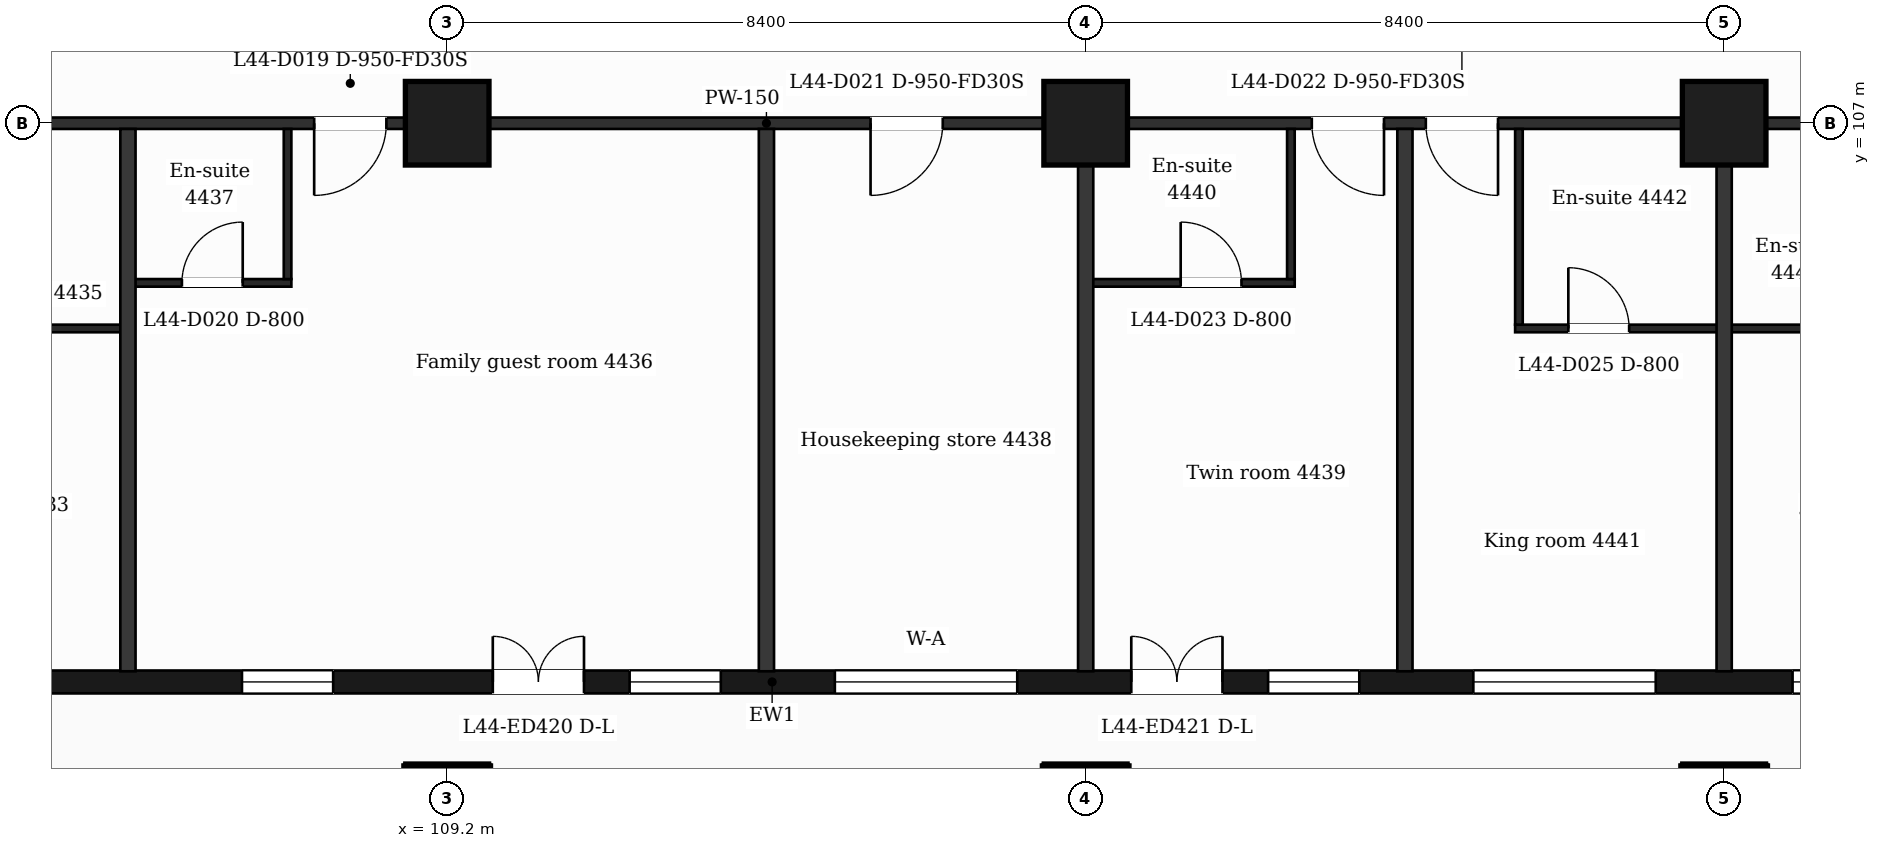
"""IFC4 building model, lengths in metres.
Left out: names, types, materials, properties, quantities, classifications, styles, units other than length and angle.
Written with IfcOpenShell. Run it as: python <this file> out.ifc"""

import sys

from ifc_helpers import new_model, si_unit, direction, frame, frame_2d, origin, origin_2d, place, context, subcontext, project, spatial, rectangle, extrude, element, fill, save


model = new_model("IFC4")
c1 = context("Model", 3, precision=1e-05, world=origin(), true_north=direction((0.0, 1.0)))
c2 = subcontext(c1, "Body", "Model", "MODEL_VIEW")
j1 = project(units=[si_unit("LENGTHUNIT", "METRE"), si_unit("PLANEANGLEUNIT", "RADIAN")], contexts=[c1])
p1 = place(None, origin())
s1 = spatial("IfcSite", under=j1, at=p1, CompositionType="ELEMENT")
p2 = place(p1, origin())
s2 = spatial("IfcBuilding", under=s1, at=p2, CompositionType="ELEMENT")
p3 = place(p2, frame((0.0, 0.0, 184.8)))
s3 = spatial("IfcBuildingStorey", under=s2, at=p3, CompositionType="ELEMENT", Elevation=184.8)
for number, where, z_axis, x_axis in (
    (1, (109.2, 98.0, 0.0), (0.0, 0.0, 1.0), (1.0, 0.0, 0.0)),
    (2, (117.6, 98.0, 0.0), (0.0, 0.0, 1.0), (1.0, 0.0, 0.0)),
    (3, (126.0, 98.0, 0.0), (0.0, 0.0, 1.0), (1.0, 0.0, 0.0)),
    (4, (109.2, 107.0, 0.0), (0.0, 0.0, 1.0), (1.0, 0.0, 0.0)),
    (5, (117.6, 107.0, 0.0), (0.0, 0.0, 1.0), (1.0, 0.0, 0.0)),
    (6, (126.0, 107.0, 0.0), (0.0, 0.0, 1.0), (1.0, 0.0, 0.0)),
):
    element("IfcColumn", number, at=place(p3, frame(where, z_axis=z_axis, x_axis=x_axis)), inside=s3, PredefinedType="COLUMN", context=c2, shape_type="SweptSolid", body=[
        extrude(rectangle(XDim=1.1, YDim=1.1, at=origin_2d()), origin(), (0.0, 0.0, 1.0), 3.7),
    ])
p4 = place(p3, frame((89.85, 99.65, 0.0), z_axis=(0.0, 0.0, 1.0), x_axis=(1.0, 0.0, 0.0)))
e7 = element("IfcWall", 7, at=p4, inside=s3, PredefinedType="SOLIDWALL", context=c2, shape_type="SweptSolid", body=[
    extrude(rectangle(XDim=47.25, YDim=0.3, at=frame_2d((23.625, 0.0))), origin(), (0.0, 0.0, 1.0), 3.38),
])
p5 = place(p4, frame((0.725, 0.0, 0.9)))
e8 = element("IfcOpeningElement", 8, at=p5, cuts=e7, PredefinedType="OPENING", context=c2, shape_type="SweptSolid", body=[
    extrude(rectangle(XDim=1.2, YDim=2.1, at=frame_2d((0.6, 1.05))), frame((0.0, 0.16, 0.0), z_axis=(0.0, -1.0, 0.0), x_axis=(1.0, 0.0, 0.0)), (0.0, 0.0, 1.0), 0.32),
])
p6 = place(p4, frame((3.45, 0.0, 0.9)))
e9 = element("IfcOpeningElement", 9, at=p6, cuts=e7, PredefinedType="OPENING", context=c2, shape_type="SweptSolid", body=[
    extrude(rectangle(XDim=2.4, YDim=2.1, at=frame_2d((1.2, 1.05))), frame((0.0, 0.16, 0.0), z_axis=(0.0, -1.0, 0.0), x_axis=(1.0, 0.0, 0.0)), (0.0, 0.0, 1.0), 0.32),
])
p7 = place(p4, frame((7.65, 0.0, 0.9)))
e10 = element("IfcOpeningElement", 10, at=p7, cuts=e7, PredefinedType="OPENING", context=c2, shape_type="SweptSolid", body=[
    extrude(rectangle(XDim=2.4, YDim=2.1, at=frame_2d((1.2, 1.05))), frame((0.0, 0.16, 0.0), z_axis=(0.0, -1.0, 0.0), x_axis=(1.0, 0.0, 0.0)), (0.0, 0.0, 1.0), 0.32),
])
p8 = place(p4, frame((12.45, 0.0, 0.9)))
e11 = element("IfcOpeningElement", 11, at=p8, cuts=e7, PredefinedType="OPENING", context=c2, shape_type="SweptSolid", body=[
    extrude(rectangle(XDim=1.2, YDim=2.1, at=frame_2d((0.6, 1.05))), frame((0.0, 0.16, 0.0), z_axis=(0.0, -1.0, 0.0), x_axis=(1.0, 0.0, 0.0)), (0.0, 0.0, 1.0), 0.32),
])
p9 = place(p4, frame((16.65, 0.0, 0.9)))
e12 = element("IfcOpeningElement", 12, at=p9, cuts=e7, PredefinedType="OPENING", context=c2, shape_type="SweptSolid", body=[
    extrude(rectangle(XDim=1.2, YDim=2.1, at=frame_2d((0.6, 1.05))), frame((0.0, 0.16, 0.0), z_axis=(0.0, -1.0, 0.0), x_axis=(1.0, 0.0, 0.0)), (0.0, 0.0, 1.0), 0.32),
])
p10 = place(p4, frame((19.95, 0.0, 0.0)))
e13 = element("IfcOpeningElement", 13, at=p10, cuts=e7, PredefinedType="OPENING", context=c2, shape_type="SweptSolid", body=[
    extrude(rectangle(XDim=1.2, YDim=2.4, at=frame_2d((0.6, 1.2))), frame((0.0, 0.16, 0.0), z_axis=(0.0, -1.0, 0.0), x_axis=(1.0, 0.0, 0.0)), (0.0, 0.0, 1.0), 0.32),
])
p11 = place(p4, frame((21.75, 0.0, 0.9)))
e14 = element("IfcOpeningElement", 14, at=p11, cuts=e7, PredefinedType="OPENING", context=c2, shape_type="SweptSolid", body=[
    extrude(rectangle(XDim=1.2, YDim=2.1, at=frame_2d((0.6, 1.05))), frame((0.0, 0.16, 0.0), z_axis=(0.0, -1.0, 0.0), x_axis=(1.0, 0.0, 0.0)), (0.0, 0.0, 1.0), 0.32),
])
p12 = place(p4, frame((24.45, 0.0, 0.9)))
e15 = element("IfcOpeningElement", 15, at=p12, cuts=e7, PredefinedType="OPENING", context=c2, shape_type="SweptSolid", body=[
    extrude(rectangle(XDim=2.4, YDim=2.1, at=frame_2d((1.2, 1.05))), frame((0.0, 0.16, 0.0), z_axis=(0.0, -1.0, 0.0), x_axis=(1.0, 0.0, 0.0)), (0.0, 0.0, 1.0), 0.32),
])
p13 = place(p4, frame((28.35, 0.0, 0.0)))
e16 = element("IfcOpeningElement", 16, at=p13, cuts=e7, PredefinedType="OPENING", context=c2, shape_type="SweptSolid", body=[
    extrude(rectangle(XDim=1.2, YDim=2.4, at=frame_2d((0.6, 1.2))), frame((0.0, 0.16, 0.0), z_axis=(0.0, -1.0, 0.0), x_axis=(1.0, 0.0, 0.0)), (0.0, 0.0, 1.0), 0.32),
])
p14 = place(p4, frame((30.15, 0.0, 0.9)))
e17 = element("IfcOpeningElement", 17, at=p14, cuts=e7, PredefinedType="OPENING", context=c2, shape_type="SweptSolid", body=[
    extrude(rectangle(XDim=1.2, YDim=2.1, at=frame_2d((0.6, 1.05))), frame((0.0, 0.16, 0.0), z_axis=(0.0, -1.0, 0.0), x_axis=(1.0, 0.0, 0.0)), (0.0, 0.0, 1.0), 0.32),
])
p15 = place(p4, frame((32.85, 0.0, 0.9)))
e18 = element("IfcOpeningElement", 18, at=p15, cuts=e7, PredefinedType="OPENING", context=c2, shape_type="SweptSolid", body=[
    extrude(rectangle(XDim=2.4, YDim=2.1, at=frame_2d((1.2, 1.05))), frame((0.0, 0.16, 0.0), z_axis=(0.0, -1.0, 0.0), x_axis=(1.0, 0.0, 0.0)), (0.0, 0.0, 1.0), 0.32),
])
p16 = place(p4, frame((37.05, 0.0, 0.9)))
e19 = element("IfcOpeningElement", 19, at=p16, cuts=e7, PredefinedType="OPENING", context=c2, shape_type="SweptSolid", body=[
    extrude(rectangle(XDim=2.4, YDim=2.1, at=frame_2d((1.2, 1.05))), frame((0.0, 0.16, 0.0), z_axis=(0.0, -1.0, 0.0), x_axis=(1.0, 0.0, 0.0)), (0.0, 0.0, 1.0), 0.32),
])
p17 = place(p4, frame((41.85, 0.0, 0.9)))
e20 = element("IfcOpeningElement", 20, at=p17, cuts=e7, PredefinedType="OPENING", context=c2, shape_type="SweptSolid", body=[
    extrude(rectangle(XDim=1.2, YDim=2.1, at=frame_2d((0.6, 1.05))), frame((0.0, 0.16, 0.0), z_axis=(0.0, -1.0, 0.0), x_axis=(1.0, 0.0, 0.0)), (0.0, 0.0, 1.0), 0.32),
])
p18 = place(p4, frame((45.25, 0.0, 0.9)))
e21 = element("IfcOpeningElement", 21, at=p18, cuts=e7, PredefinedType="OPENING", context=c2, shape_type="SweptSolid", body=[
    extrude(rectangle(XDim=1.2, YDim=2.1, at=frame_2d((0.6, 1.05))), frame((0.0, 0.16, 0.0), z_axis=(0.0, -1.0, 0.0), x_axis=(1.0, 0.0, 0.0)), (0.0, 0.0, 1.0), 0.32),
])
p19 = place(p3, frame((102.55, 104.3, 0.0), z_axis=(0.0, 0.0, 1.0), x_axis=(1.0, 0.0, 0.0)))
e22 = element("IfcWall", 22, at=p19, inside=s3, PredefinedType="PARTITIONING", context=c2, shape_type="SweptSolid", body=[
    extrude(rectangle(XDim=2.45, YDim=0.1, at=frame_2d((1.225, 0.0))), origin(), (0.0, 0.0, 1.0), 3.38),
])
p20 = place(p3, frame((123.25, 104.3, 0.0), z_axis=(0.0, 0.0, 1.0), x_axis=(1.0, 0.0, 0.0)))
e23 = element("IfcWall", 23, at=p20, inside=s3, PredefinedType="PARTITIONING", context=c2, shape_type="SweptSolid", body=[
    extrude(rectangle(XDim=4.9, YDim=0.1, at=frame_2d((2.45, 0.0))), origin(), (0.0, 0.0, 1.0), 3.38),
])
p21 = place(p20, frame((0.7, 0.0, 0.0)))
e24 = element("IfcOpeningElement", 24, at=p21, cuts=e23, PredefinedType="OPENING", context=c2, shape_type="SweptSolid", body=[
    extrude(rectangle(XDim=0.8, YDim=2.1, at=frame_2d((0.4, 1.05))), frame((0.0, 0.06, 0.0), z_axis=(0.0, -1.0, 0.0), x_axis=(1.0, 0.0, 0.0)), (0.0, 0.0, 1.0), 0.12),
])
p22 = place(p3, frame((105.0, 104.9, 0.0), z_axis=(0.0, 0.0, 1.0), x_axis=(1.0, 0.0, 0.0)))
e25 = element("IfcWall", 25, at=p22, inside=s3, PredefinedType="PARTITIONING", context=c2, shape_type="SweptSolid", body=[
    extrude(rectangle(XDim=2.15, YDim=0.1, at=frame_2d((1.075, 0.0))), origin(), (0.0, 0.0, 1.0), 3.38),
])
p23 = place(p22, frame((0.71, 0.0, 0.0)))
e26 = element("IfcOpeningElement", 26, at=p23, cuts=e25, PredefinedType="OPENING", context=c2, shape_type="SweptSolid", body=[
    extrude(rectangle(XDim=0.8, YDim=2.1, at=frame_2d((0.4, 1.05))), frame((0.0, 0.06, 0.0), z_axis=(0.0, -1.0, 0.0), x_axis=(1.0, 0.0, 0.0)), (0.0, 0.0, 1.0), 0.12),
])
p24 = place(p3, frame((117.6, 104.9, 0.0), z_axis=(0.0, 0.0, 1.0), x_axis=(1.0, 0.0, 0.0)))
e27 = element("IfcWall", 27, at=p24, inside=s3, PredefinedType="PARTITIONING", context=c2, shape_type="SweptSolid", body=[
    extrude(rectangle(XDim=2.75, YDim=0.1, at=frame_2d((1.375, 0.0))), origin(), (0.0, 0.0, 1.0), 3.38),
])
p25 = place(p24, frame((1.25, 0.0, 0.0)))
e28 = element("IfcOpeningElement", 28, at=p25, cuts=e27, PredefinedType="OPENING", context=c2, shape_type="SweptSolid", body=[
    extrude(rectangle(XDim=0.8, YDim=2.1, at=frame_2d((0.4, 1.05))), frame((0.0, 0.06, 0.0), z_axis=(0.0, -1.0, 0.0), x_axis=(1.0, 0.0, 0.0)), (0.0, 0.0, 1.0), 0.12),
])
p26 = place(p3, frame((87.018, 107.0, 0.0), z_axis=(0.0, 0.0, 1.0), x_axis=(1.0, 0.0, 0.0)))
e29 = element("IfcWall", 29, at=p26, inside=s3, PredefinedType="PARTITIONING", context=c2, shape_type="SweptSolid", body=[
    extrude(rectangle(XDim=52.765, YDim=0.15, at=frame_2d((26.382, 0.0))), origin(), (0.0, 0.0, 1.0), 3.38),
])
p27 = place(p26, frame((0.87, 0.0, 0.0)))
e30 = element("IfcOpeningElement", 30, at=p27, cuts=e29, PredefinedType="OPENING", context=c2, shape_type="SweptSolid", body=[
    extrude(rectangle(XDim=0.95, YDim=2.1, at=frame_2d((0.475, 1.05))), frame((0.0, 0.085, 0.0), z_axis=(0.0, -1.0, 0.0), x_axis=(1.0, 0.0, 0.0)), (0.0, 0.0, 1.0), 0.17),
])
p28 = place(p26, frame((10.757, 0.0, 0.0)))
e31 = element("IfcOpeningElement", 31, at=p28, cuts=e29, PredefinedType="OPENING", context=c2, shape_type="SweptSolid", body=[
    extrude(rectangle(XDim=1.0, YDim=2.1, at=frame_2d((0.5, 1.05))), frame((0.0, 0.085, 0.0), z_axis=(0.0, -1.0, 0.0), x_axis=(1.0, 0.0, 0.0)), (0.0, 0.0, 1.0), 0.17),
])
p29 = place(p26, frame((20.432, 0.0, 0.0)))
e32 = element("IfcOpeningElement", 32, at=p29, cuts=e29, PredefinedType="OPENING", context=c2, shape_type="SweptSolid", body=[
    extrude(rectangle(XDim=0.95, YDim=2.1, at=frame_2d((0.475, 1.05))), frame((0.0, 0.085, 0.0), z_axis=(0.0, -1.0, 0.0), x_axis=(1.0, 0.0, 0.0)), (0.0, 0.0, 1.0), 0.17),
])
p30 = place(p26, frame((27.752, 0.0, 0.0)))
e33 = element("IfcOpeningElement", 33, at=p30, cuts=e29, PredefinedType="OPENING", context=c2, shape_type="SweptSolid", body=[
    extrude(rectangle(XDim=0.95, YDim=2.1, at=frame_2d((0.475, 1.05))), frame((0.0, 0.085, 0.0), z_axis=(0.0, -1.0, 0.0), x_axis=(1.0, 0.0, 0.0)), (0.0, 0.0, 1.0), 0.17),
])
p31 = place(p26, frame((33.557, 0.0, 0.0)))
e34 = element("IfcOpeningElement", 34, at=p31, cuts=e29, PredefinedType="OPENING", context=c2, shape_type="SweptSolid", body=[
    extrude(rectangle(XDim=0.95, YDim=2.1, at=frame_2d((0.475, 1.05))), frame((0.0, 0.085, 0.0), z_axis=(0.0, -1.0, 0.0), x_axis=(1.0, 0.0, 0.0)), (0.0, 0.0, 1.0), 0.17),
])
p32 = place(p26, frame((35.057, 0.0, 0.0)))
e35 = element("IfcOpeningElement", 35, at=p32, cuts=e29, PredefinedType="OPENING", context=c2, shape_type="SweptSolid", body=[
    extrude(rectangle(XDim=0.95, YDim=2.1, at=frame_2d((0.475, 1.05))), frame((0.0, 0.085, 0.0), z_axis=(0.0, -1.0, 0.0), x_axis=(1.0, 0.0, 0.0)), (0.0, 0.0, 1.0), 0.17),
])
p33 = place(p26, frame((45.407, 0.0, 0.0)))
e36 = element("IfcOpeningElement", 36, at=p33, cuts=e29, PredefinedType="OPENING", context=c2, shape_type="SweptSolid", body=[
    extrude(rectangle(XDim=1.0, YDim=2.1, at=frame_2d((0.5, 1.05))), frame((0.0, 0.085, 0.0), z_axis=(0.0, -1.0, 0.0), x_axis=(1.0, 0.0, 0.0)), (0.0, 0.0, 1.0), 0.17),
])
p34 = place(p26, frame((49.285, 0.0, 0.0)))
e37 = element("IfcOpeningElement", 37, at=p34, cuts=e29, PredefinedType="OPENING", context=c2, shape_type="SweptSolid", body=[
    extrude(rectangle(XDim=0.95, YDim=2.1, at=frame_2d((0.475, 1.05))), frame((0.0, 0.085, 0.0), z_axis=(0.0, -1.0, 0.0), x_axis=(1.0, 0.0, 0.0)), (0.0, 0.0, 1.0), 0.17),
])
p35 = place(p3, frame((105.0, 99.79, 0.0), z_axis=(0.0, 0.0, 1.0), x_axis=(0.0, 1.0, 0.0)))
e38 = element("IfcWall", 38, at=p35, inside=s3, PredefinedType="PARTITIONING", context=c2, shape_type="SweptSolid", body=[
    extrude(rectangle(XDim=7.135, YDim=0.2, at=frame_2d((3.567, 0.0))), origin(), (0.0, 0.0, 1.0), 3.38),
])
p36 = place(p3, frame((107.1, 104.95, 0.0), z_axis=(0.0, 0.0, 1.0), x_axis=(0.0, 1.0, 0.0)))
e39 = element("IfcWall", 39, at=p36, inside=s3, PredefinedType="PARTITIONING", context=c2, shape_type="SweptSolid", body=[
    extrude(rectangle(XDim=1.975, YDim=0.1, at=frame_2d((0.988, 0.0))), origin(), (0.0, 0.0, 1.0), 3.38),
])
for number, where, z_axis, x_axis in (
    (40, (113.4, 99.79, 0.0), (0.0, 0.0, 1.0), (0.0, 1.0, 0.0)),
    (41, (117.6, 99.79, 0.0), (0.0, 0.0, 1.0), (0.0, 1.0, 0.0)),
):
    element("IfcWall", number, at=place(p3, frame(where, z_axis=z_axis, x_axis=x_axis)), inside=s3, PredefinedType="PARTITIONING", context=c2, shape_type="SweptSolid", body=[
        extrude(rectangle(XDim=7.135, YDim=0.2, at=frame_2d((3.567, 0.0))), origin(), (0.0, 0.0, 1.0), 3.38),
    ])
p37 = place(p3, frame((120.3, 104.95, 0.0), z_axis=(0.0, 0.0, 1.0), x_axis=(0.0, 1.0, 0.0)))
e42 = element("IfcWall", 42, at=p37, inside=s3, PredefinedType="PARTITIONING", context=c2, shape_type="SweptSolid", body=[
    extrude(rectangle(XDim=1.975, YDim=0.1, at=frame_2d((0.988, 0.0))), origin(), (0.0, 0.0, 1.0), 3.38),
])
p38 = place(p3, frame((121.8, 99.79, 0.0), z_axis=(0.0, 0.0, 1.0), x_axis=(0.0, 1.0, 0.0)))
e43 = element("IfcWall", 43, at=p38, inside=s3, PredefinedType="PARTITIONING", context=c2, shape_type="SweptSolid", body=[
    extrude(rectangle(XDim=7.135, YDim=0.2, at=frame_2d((3.567, 0.0))), origin(), (0.0, 0.0, 1.0), 3.38),
])
p39 = place(p3, frame((123.3, 104.35, 0.0), z_axis=(0.0, 0.0, 1.0), x_axis=(0.0, 1.0, 0.0)))
e44 = element("IfcWall", 44, at=p39, inside=s3, PredefinedType="PARTITIONING", context=c2, shape_type="SweptSolid", body=[
    extrude(rectangle(XDim=2.575, YDim=0.1, at=frame_2d((1.288, 0.0))), origin(), (0.0, 0.0, 1.0), 3.38),
])
p40 = place(p3, frame((126.0, 99.79, 0.0), z_axis=(0.0, 0.0, 1.0), x_axis=(0.0, 1.0, 0.0)))
e45 = element("IfcWall", 45, at=p40, inside=s3, PredefinedType="PARTITIONING", context=c2, shape_type="SweptSolid", body=[
    extrude(rectangle(XDim=7.135, YDim=0.2, at=frame_2d((3.567, 0.0))), origin(), (0.0, 0.0, 1.0), 3.38),
])
p41 = place(p9, origin())
e46 = element("IfcWindow", 46, at=p41, inside=s3, PartitioningType="SINGLE_PANEL", PredefinedType="WINDOW", context=c2, shape_type="SweptSolid", body=[
    extrude(rectangle(XDim=1.2, YDim=2.1, at=frame_2d((0.6, 1.05))), frame((0.0, 0.03, 0.0), z_axis=(0.0, -1.0, 0.0), x_axis=(1.0, 0.0, 0.0)), (0.0, 0.0, 1.0), 0.06),
])
fill(e12, e46)
p42 = place(p10, origin())
e47 = element("IfcDoor", 47, at=p42, inside=s3, OperationType="DOUBLE_DOOR_SINGLE_SWING", PredefinedType="DOOR", context=c2, shape_type="SweptSolid", body=[
    extrude(rectangle(XDim=1.2, YDim=2.4, at=frame_2d((0.6, 1.2))), frame((0.0, 0.025, 0.0), z_axis=(0.0, -1.0, 0.0), x_axis=(1.0, 0.0, 0.0)), (0.0, 0.0, 1.0), 0.05),
])
fill(e13, e47)
p43 = place(p11, origin())
e48 = element("IfcWindow", 48, at=p43, inside=s3, PartitioningType="SINGLE_PANEL", PredefinedType="WINDOW", context=c2, shape_type="SweptSolid", body=[
    extrude(rectangle(XDim=1.2, YDim=2.1, at=frame_2d((0.6, 1.05))), frame((0.0, 0.03, 0.0), z_axis=(0.0, -1.0, 0.0), x_axis=(1.0, 0.0, 0.0)), (0.0, 0.0, 1.0), 0.06),
])
fill(e14, e48)
p44 = place(p12, origin())
e49 = element("IfcWindow", 49, at=p44, inside=s3, PartitioningType="SINGLE_PANEL", PredefinedType="WINDOW", context=c2, shape_type="SweptSolid", body=[
    extrude(rectangle(XDim=2.4, YDim=2.1, at=frame_2d((1.2, 1.05))), frame((0.0, 0.03, 0.0), z_axis=(0.0, -1.0, 0.0), x_axis=(1.0, 0.0, 0.0)), (0.0, 0.0, 1.0), 0.06),
])
fill(e15, e49)
p45 = place(p13, origin())
e50 = element("IfcDoor", 50, at=p45, inside=s3, OperationType="DOUBLE_DOOR_SINGLE_SWING", PredefinedType="DOOR", context=c2, shape_type="SweptSolid", body=[
    extrude(rectangle(XDim=1.2, YDim=2.4, at=frame_2d((0.6, 1.2))), frame((0.0, 0.025, 0.0), z_axis=(0.0, -1.0, 0.0), x_axis=(1.0, 0.0, 0.0)), (0.0, 0.0, 1.0), 0.05),
])
fill(e16, e50)
p46 = place(p14, origin())
e51 = element("IfcWindow", 51, at=p46, inside=s3, PartitioningType="SINGLE_PANEL", PredefinedType="WINDOW", context=c2, shape_type="SweptSolid", body=[
    extrude(rectangle(XDim=1.2, YDim=2.1, at=frame_2d((0.6, 1.05))), frame((0.0, 0.03, 0.0), z_axis=(0.0, -1.0, 0.0), x_axis=(1.0, 0.0, 0.0)), (0.0, 0.0, 1.0), 0.06),
])
fill(e17, e51)
p47 = place(p15, origin())
e52 = element("IfcWindow", 52, at=p47, inside=s3, PartitioningType="SINGLE_PANEL", PredefinedType="WINDOW", context=c2, shape_type="SweptSolid", body=[
    extrude(rectangle(XDim=2.4, YDim=2.1, at=frame_2d((1.2, 1.05))), frame((0.0, 0.03, 0.0), z_axis=(0.0, -1.0, 0.0), x_axis=(1.0, 0.0, 0.0)), (0.0, 0.0, 1.0), 0.06),
])
fill(e18, e52)
p48 = place(p16, origin())
e53 = element("IfcWindow", 53, at=p48, inside=s3, PartitioningType="SINGLE_PANEL", PredefinedType="WINDOW", context=c2, shape_type="SweptSolid", body=[
    extrude(rectangle(XDim=2.4, YDim=2.1, at=frame_2d((1.2, 1.05))), frame((0.0, 0.03, 0.0), z_axis=(0.0, -1.0, 0.0), x_axis=(1.0, 0.0, 0.0)), (0.0, 0.0, 1.0), 0.06),
])
fill(e19, e53)
p49 = place(p29, origin())
e54 = element("IfcDoor", 54, at=p49, inside=s3, OperationType="SINGLE_SWING_LEFT", PredefinedType="DOOR", context=c2, shape_type="SweptSolid", body=[
    extrude(rectangle(XDim=0.95, YDim=2.1, at=frame_2d((0.475, 1.05))), frame((0.0, 0.025, 0.0), z_axis=(0.0, -1.0, 0.0), x_axis=(1.0, 0.0, 0.0)), (0.0, 0.0, 1.0), 0.05),
])
fill(e32, e54)
p50 = place(p23, origin())
e55 = element("IfcDoor", 55, at=p50, inside=s3, OperationType="SINGLE_SWING_RIGHT", PredefinedType="DOOR", context=c2, shape_type="SweptSolid", body=[
    extrude(rectangle(XDim=0.8, YDim=2.1, at=frame_2d((0.4, 1.05))), frame((0.0, 0.025, 0.0), z_axis=(0.0, -1.0, 0.0), x_axis=(1.0, 0.0, 0.0)), (0.0, 0.0, 1.0), 0.05),
])
fill(e26, e55)
p51 = place(p30, origin())
e56 = element("IfcDoor", 56, at=p51, inside=s3, OperationType="SINGLE_SWING_LEFT", PredefinedType="DOOR", context=c2, shape_type="SweptSolid", body=[
    extrude(rectangle(XDim=0.95, YDim=2.1, at=frame_2d((0.475, 1.05))), frame((0.0, 0.025, 0.0), z_axis=(0.0, -1.0, 0.0), x_axis=(1.0, 0.0, 0.0)), (0.0, 0.0, 1.0), 0.05),
])
fill(e33, e56)
p52 = place(p31, origin())
e57 = element("IfcDoor", 57, at=p52, inside=s3, OperationType="SINGLE_SWING_RIGHT", PredefinedType="DOOR", context=c2, shape_type="SweptSolid", body=[
    extrude(rectangle(XDim=0.95, YDim=2.1, at=frame_2d((0.475, 1.05))), frame((0.0, 0.025, 0.0), z_axis=(0.0, -1.0, 0.0), x_axis=(1.0, 0.0, 0.0)), (0.0, 0.0, 1.0), 0.05),
])
fill(e34, e57)
p53 = place(p25, origin())
e58 = element("IfcDoor", 58, at=p53, inside=s3, OperationType="SINGLE_SWING_LEFT", PredefinedType="DOOR", context=c2, shape_type="SweptSolid", body=[
    extrude(rectangle(XDim=0.8, YDim=2.1, at=frame_2d((0.4, 1.05))), frame((0.0, 0.025, 0.0), z_axis=(0.0, -1.0, 0.0), x_axis=(1.0, 0.0, 0.0)), (0.0, 0.0, 1.0), 0.05),
])
fill(e28, e58)
p54 = place(p32, origin())
e59 = element("IfcDoor", 59, at=p54, inside=s3, OperationType="SINGLE_SWING_RIGHT", PredefinedType="DOOR", context=c2, shape_type="SweptSolid", body=[
    extrude(rectangle(XDim=0.95, YDim=2.1, at=frame_2d((0.475, 1.05))), frame((0.0, 0.025, 0.0), z_axis=(0.0, -1.0, 0.0), x_axis=(1.0, 0.0, 0.0)), (0.0, 0.0, 1.0), 0.05),
])
fill(e35, e59)
p55 = place(p21, origin())
e60 = element("IfcDoor", 60, at=p55, inside=s3, OperationType="SINGLE_SWING_LEFT", PredefinedType="DOOR", context=c2, shape_type="SweptSolid", body=[
    extrude(rectangle(XDim=0.8, YDim=2.1, at=frame_2d((0.4, 1.05))), frame((0.0, 0.025, 0.0), z_axis=(0.0, -1.0, 0.0), x_axis=(1.0, 0.0, 0.0)), (0.0, 0.0, 1.0), 0.05),
])
fill(e24, e60)
save(model, sys.argv[1])
